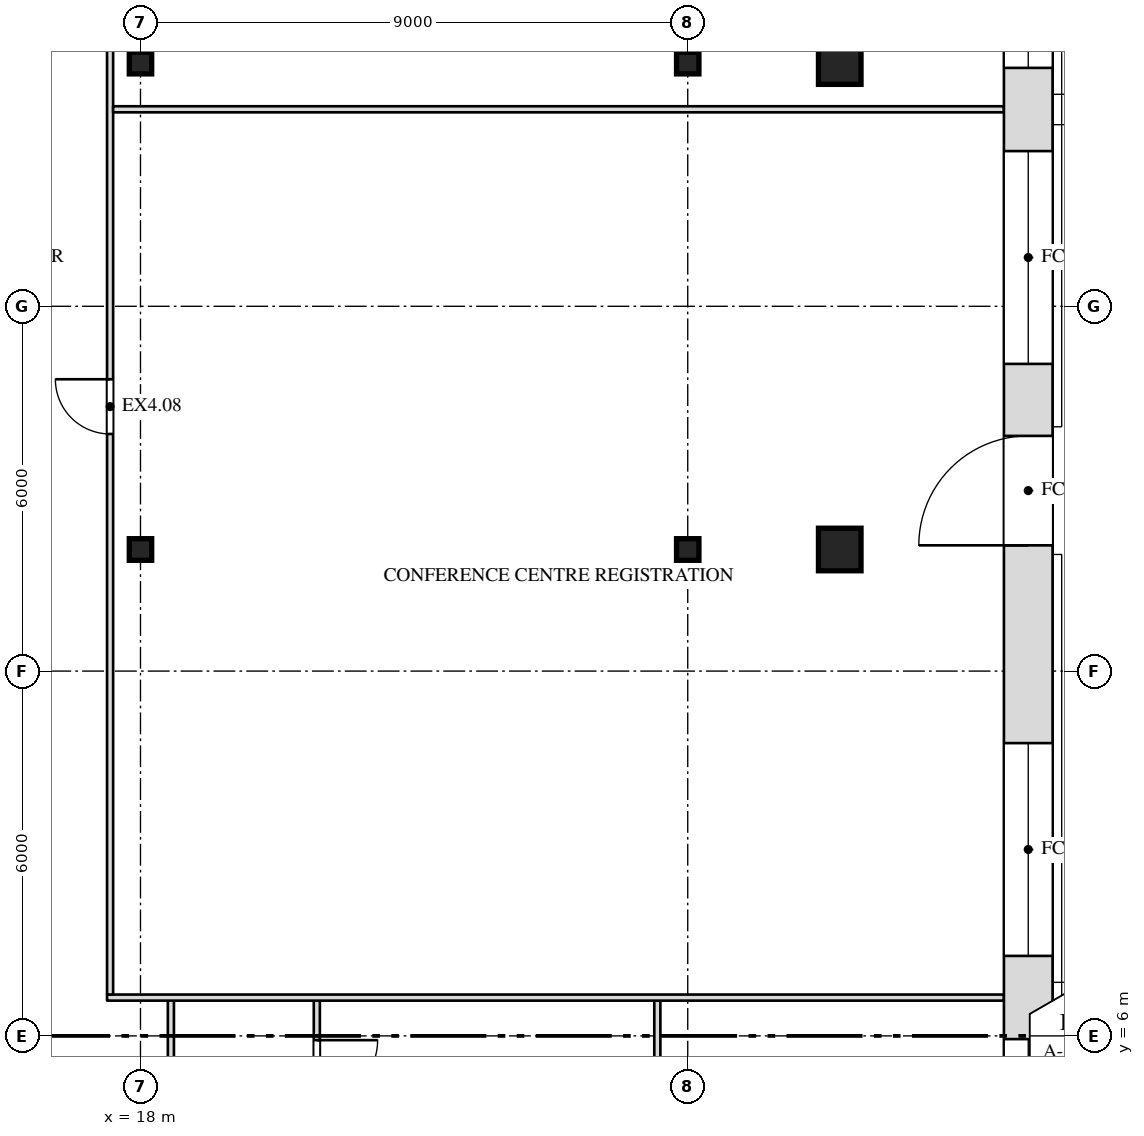
"""IFC4 building model, lengths in metres.
Left out: names, types, materials, properties, quantities, classifications, styles, units other than length and angle.
Written with IfcOpenShell. Run it as: python <this file> out.ifc"""

import sys

from ifc_helpers import new_model, si_unit, direction, frame, frame_2d, origin, origin_2d, place, context, subcontext, project, spatial, rectangle, i_section, extrude, element, fill, save


model = new_model("IFC4")
c1 = context("Model", 3, precision=1e-05, world=origin(), true_north=direction((0.0, 1.0)))
c2 = subcontext(c1, "Body", "Model", "MODEL_VIEW")
j1 = project(units=[si_unit("LENGTHUNIT", "METRE"), si_unit("PLANEANGLEUNIT", "RADIAN")], contexts=[c1])
p1 = place(None, origin())
s1 = spatial("IfcSite", under=j1, at=p1, CompositionType="ELEMENT")
p2 = place(p1, origin())
s2 = spatial("IfcBuilding", under=s1, at=p2, CompositionType="ELEMENT")
p3 = place(p2, frame((0.0, 0.0, 284.5)))
s3 = spatial("IfcBuildingStorey", under=s2, at=p3, CompositionType="ELEMENT", Elevation=284.5)
for number, where, z_axis, x_axis in (
    (1, (18.0, 14.0, 0.0), (0.0, 0.0, 1.0), (1.0, 0.0, 0.0)),
    (2, (27.0, 14.0, 0.0), (0.0, 0.0, 1.0), (1.0, 0.0, 0.0)),
):
    element("IfcColumn", number, at=place(p3, frame(where, z_axis=z_axis, x_axis=x_axis)), inside=s3, PredefinedType="COLUMN", context=c2, shape_type="SweptSolid", body=[
        extrude(i_section(OverallWidth=0.368, OverallDepth=0.356, WebThickness=0.011, FlangeThickness=0.018, at=origin_2d()), origin(), (0.0, 0.0, 1.0), 4.0),
    ])
p4 = place(p3, frame((29.5, 14.0, 0.0), z_axis=(0.0, 0.0, 1.0), x_axis=(1.0, 0.0, 0.0)))
e3 = element("IfcColumn", 3, at=p4, inside=s3, PredefinedType="COLUMN", context=c2, shape_type="SweptSolid", body=[
    extrude(rectangle(XDim=0.7, YDim=0.7, at=origin_2d()), origin(), (0.0, 0.0, 1.0), 4.0),
])
for number, where, z_axis, x_axis in (
    (4, (18.0, 22.0, 0.0), (0.0, 0.0, 1.0), (1.0, 0.0, 0.0)),
    (5, (27.0, 22.0, 0.0), (0.0, 0.0, 1.0), (1.0, 0.0, 0.0)),
):
    element("IfcColumn", number, at=place(p3, frame(where, z_axis=z_axis, x_axis=x_axis)), inside=s3, PredefinedType="COLUMN", context=c2, shape_type="SweptSolid", body=[
        extrude(i_section(OverallWidth=0.368, OverallDepth=0.356, WebThickness=0.011, FlangeThickness=0.018, at=origin_2d()), origin(), (0.0, 0.0, 1.0), 4.0),
    ])
p5 = place(p3, frame((29.5, 22.0, 0.0), z_axis=(0.0, 0.0, 1.0), x_axis=(1.0, 0.0, 0.0)))
e6 = element("IfcColumn", 6, at=p5, inside=s3, PredefinedType="COLUMN", context=c2, shape_type="SweptSolid", body=[
    extrude(rectangle(XDim=0.7, YDim=0.7, at=origin_2d()), origin(), (0.0, 0.0, 1.0), 4.0),
])
p6 = place(p3, frame((18.5, -2.0, 0.0), z_axis=(0.0, 0.0, 1.0), x_axis=(0.0, 1.0, 0.0)))
e7 = element("IfcWall", 7, at=p6, inside=s3, PredefinedType="PARTITIONING", context=c2, shape_type="SweptSolid", body=[
    extrude(rectangle(XDim=8.58, YDim=0.1, at=frame_2d((4.29, 0.0))), origin(), (0.0, 0.0, 1.0), 3.78),
])
p7 = place(p6, frame((3.8, 0.0, 0.0)))
e8 = element("IfcOpeningElement", 8, at=p7, cuts=e7, PredefinedType="OPENING", context=c2, shape_type="SweptSolid", body=[
    extrude(rectangle(XDim=1.0, YDim=2.1, at=frame_2d((0.5, 1.05))), frame((0.0, 0.062, 0.0), z_axis=(0.0, -1.0, 0.0), x_axis=(1.0, 0.0, 0.0)), (0.0, 0.0, 1.0), 0.124),
])
p8 = place(p3, frame((20.9, -2.0, 0.0), z_axis=(0.0, 0.0, 1.0), x_axis=(0.0, 1.0, 0.0)))
e9 = element("IfcWall", 9, at=p8, inside=s3, PredefinedType="PARTITIONING", context=c2, shape_type="SweptSolid", body=[
    extrude(rectangle(XDim=8.58, YDim=0.1, at=frame_2d((4.29, 0.0))), origin(), (0.0, 0.0, 1.0), 3.78),
])
p9 = place(p8, frame((1.05, 0.0, 0.0)))
e10 = element("IfcOpeningElement", 10, at=p9, cuts=e9, PredefinedType="OPENING", context=c2, shape_type="SweptSolid", body=[
    extrude(rectangle(XDim=1.0, YDim=2.1, at=frame_2d((0.5, 1.05))), frame((0.0, 0.062, 0.0), z_axis=(0.0, -1.0, 0.0), x_axis=(1.0, 0.0, 0.0)), (0.0, 0.0, 1.0), 0.124),
])
p10 = place(p8, frame((4.165, 0.0, 0.0)))
e11 = element("IfcOpeningElement", 11, at=p10, cuts=e9, PredefinedType="OPENING", context=c2, shape_type="SweptSolid", body=[
    extrude(rectangle(XDim=1.0, YDim=2.1, at=frame_2d((0.5, 1.05))), frame((0.0, 0.062, 0.0), z_axis=(0.0, -1.0, 0.0), x_axis=(1.0, 0.0, 0.0)), (0.0, 0.0, 1.0), 0.124),
])
p11 = place(p8, frame((6.93, 0.0, 0.0)))
e12 = element("IfcOpeningElement", 12, at=p11, cuts=e9, PredefinedType="OPENING", context=c2, shape_type="SweptSolid", body=[
    extrude(rectangle(XDim=1.0, YDim=2.1, at=frame_2d((0.5, 1.05))), frame((0.0, 0.062, 0.0), z_axis=(0.0, -1.0, 0.0), x_axis=(1.0, 0.0, 0.0)), (0.0, 0.0, 1.0), 0.124),
])
p12 = place(p3, frame((26.5, -2.0, 0.0), z_axis=(0.0, 0.0, 1.0), x_axis=(0.0, 1.0, 0.0)))
e13 = element("IfcWall", 13, at=p12, inside=s3, PredefinedType="PARTITIONING", context=c2, shape_type="SweptSolid", body=[
    extrude(rectangle(XDim=8.58, YDim=0.1, at=frame_2d((4.29, 0.0))), origin(), (0.0, 0.0, 1.0), 3.78),
])
p13 = place(p3, frame((17.45, 6.63, 0.0), z_axis=(0.0, 0.0, 1.0), x_axis=(1.0, 0.0, 0.0)))
e14 = element("IfcWall", 14, at=p13, inside=s3, PredefinedType="PARTITIONING", context=c2, shape_type="SweptSolid", body=[
    extrude(rectangle(XDim=14.75, YDim=0.1, at=frame_2d((7.375, 0.0))), origin(), (0.0, 0.0, 1.0), 3.78),
])
p14 = place(p3, frame((17.5, 6.68, 0.0), z_axis=(0.0, 0.0, 1.0), x_axis=(0.0, 1.0, 0.0)))
e15 = element("IfcWall", 15, at=p14, inside=s3, PredefinedType="PARTITIONING", context=c2, shape_type="SweptSolid", body=[
    extrude(rectangle(XDim=29.52, YDim=0.1, at=frame_2d((14.76, 0.0))), origin(), (0.0, 0.0, 1.0), 3.78),
])
p15 = place(p14, frame((9.22, 0.0, 0.0)))
e16 = element("IfcOpeningElement", 16, at=p15, cuts=e15, PredefinedType="OPENING", context=c2, shape_type="SweptSolid", body=[
    extrude(rectangle(XDim=0.9, YDim=2.1, at=frame_2d((0.45, 1.05))), frame((0.0, 0.062, 0.0), z_axis=(0.0, -1.0, 0.0), x_axis=(1.0, 0.0, 0.0)), (0.0, 0.0, 1.0), 0.124),
])
p16 = place(p14, frame((16.56, 0.0, 0.0)))
e17 = element("IfcOpeningElement", 17, at=p16, cuts=e15, PredefinedType="OPENING", context=c2, shape_type="SweptSolid", body=[
    extrude(rectangle(XDim=0.9, YDim=2.1, at=frame_2d((0.45, 1.05))), frame((0.0, 0.062, 0.0), z_axis=(0.0, -1.0, 0.0), x_axis=(1.0, 0.0, 0.0)), (0.0, 0.0, 1.0), 0.124),
])
p17 = place(p3, frame((17.55, 21.24, 0.0), z_axis=(0.0, 0.0, 1.0), x_axis=(1.0, 0.0, 0.0)))
e18 = element("IfcWall", 18, at=p17, inside=s3, PredefinedType="PARTITIONING", context=c2, shape_type="SweptSolid", body=[
    extrude(rectangle(XDim=14.65, YDim=0.1, at=frame_2d((7.325, 0.0))), origin(), (0.0, 0.0, 1.0), 3.78),
])
p18 = place(p3, frame((32.6, -7.948, 0.0), z_axis=(0.0, 0.0, 1.0), x_axis=(0.0, 1.0, 0.0)))
e19 = element("IfcWall", 19, at=p18, inside=s3, PredefinedType="SOLIDWALL", context=c2, shape_type="SweptSolid", body=[
    extrude(rectangle(XDim=38.895, YDim=0.8, at=frame_2d((19.448, 0.0))), origin(), (0.0, 0.0, 1.0), 3.78),
])
p19 = place(p18, frame((5.526, 0.0, 1.0)))
e20 = element("IfcOpeningElement", 20, at=p19, cuts=e19, PredefinedType="OPENING", context=c2, shape_type="SweptSolid", body=[
    extrude(rectangle(XDim=3.5, YDim=2.5, at=frame_2d((1.75, 1.25))), frame((0.0, 0.412, 0.0), z_axis=(0.0, -1.0, 0.0), x_axis=(1.0, 0.0, 0.0)), (0.0, 0.0, 1.0), 0.824),
])
p20 = place(p18, frame((10.395, 0.0, 1.0)))
e21 = element("IfcOpeningElement", 21, at=p20, cuts=e19, PredefinedType="OPENING", context=c2, shape_type="SweptSolid", body=[
    extrude(rectangle(XDim=3.5, YDim=2.5, at=frame_2d((1.75, 1.25))), frame((0.0, 0.412, 0.0), z_axis=(0.0, -1.0, 0.0), x_axis=(1.0, 0.0, 0.0)), (0.0, 0.0, 1.0), 0.824),
])
p21 = place(p18, frame((15.263, 0.0, 1.0)))
e22 = element("IfcOpeningElement", 22, at=p21, cuts=e19, PredefinedType="OPENING", context=c2, shape_type="SweptSolid", body=[
    extrude(rectangle(XDim=3.5, YDim=2.5, at=frame_2d((1.75, 1.25))), frame((0.0, 0.412, 0.0), z_axis=(0.0, -1.0, 0.0), x_axis=(1.0, 0.0, 0.0)), (0.0, 0.0, 1.0), 0.824),
])
p22 = place(p18, frame((25.0, 0.0, 1.0)))
e23 = element("IfcOpeningElement", 23, at=p22, cuts=e19, PredefinedType="OPENING", context=c2, shape_type="SweptSolid", body=[
    extrude(rectangle(XDim=3.5, YDim=2.5, at=frame_2d((1.75, 1.25))), frame((0.0, 0.412, 0.0), z_axis=(0.0, -1.0, 0.0), x_axis=(1.0, 0.0, 0.0)), (0.0, 0.0, 1.0), 0.824),
])
p23 = place(p18, frame((29.869, 0.0, 1.0)))
e24 = element("IfcOpeningElement", 24, at=p23, cuts=e19, PredefinedType="OPENING", context=c2, shape_type="SweptSolid", body=[
    extrude(rectangle(XDim=3.5, YDim=2.5, at=frame_2d((1.75, 1.25))), frame((0.0, 0.412, 0.0), z_axis=(0.0, -1.0, 0.0), x_axis=(1.0, 0.0, 0.0)), (0.0, 0.0, 1.0), 0.824),
])
p24 = place(p18, frame((22.016, 0.0, 0.0)))
e25 = element("IfcOpeningElement", 25, at=p24, cuts=e19, PredefinedType="OPENING", context=c2, shape_type="SweptSolid", body=[
    extrude(rectangle(XDim=1.8, YDim=2.4, at=frame_2d((0.9, 1.2))), frame((0.0, 0.412, 0.0), z_axis=(0.0, -1.0, 0.0), x_axis=(1.0, 0.0, 0.0)), (0.0, 0.0, 1.0), 0.824),
])
p25 = place(p11, origin())
e26 = element("IfcDoor", 26, at=p25, inside=s3, OperationType="SINGLE_SWING_LEFT", PredefinedType="DOOR", context=c2, shape_type="SweptSolid", body=[
    extrude(rectangle(XDim=1.0, YDim=2.1, at=frame_2d((0.5, 1.05))), frame((0.0, 0.025, 0.0), z_axis=(0.0, -1.0, 0.0), x_axis=(1.0, 0.0, 0.0)), (0.0, 0.0, 1.0), 0.05),
])
fill(e12, e26)
p26 = place(p15, origin())
e27 = element("IfcDoor", 27, at=p26, inside=s3, OperationType="SINGLE_SWING_RIGHT", PredefinedType="DOOR", context=c2, shape_type="SweptSolid", body=[
    extrude(rectangle(XDim=0.9, YDim=2.1, at=frame_2d((0.45, 1.05))), frame((0.0, 0.025, 0.0), z_axis=(0.0, -1.0, 0.0), x_axis=(1.0, 0.0, 0.0)), (0.0, 0.0, 1.0), 0.05),
])
fill(e16, e27)
p27 = place(p20, origin())
e28 = element("IfcWindow", 28, at=p27, inside=s3, PartitioningType="SINGLE_PANEL", PredefinedType="WINDOW", context=c2, shape_type="SweptSolid", body=[
    extrude(rectangle(XDim=3.5, YDim=2.5, at=frame_2d((1.75, 1.25))), frame((0.0, 0.03, 0.0), z_axis=(0.0, -1.0, 0.0), x_axis=(1.0, 0.0, 0.0)), (0.0, 0.0, 1.0), 0.06),
])
fill(e21, e28)
p28 = place(p21, origin())
e29 = element("IfcWindow", 29, at=p28, inside=s3, PartitioningType="SINGLE_PANEL", PredefinedType="WINDOW", context=c2, shape_type="SweptSolid", body=[
    extrude(rectangle(XDim=3.5, YDim=2.5, at=frame_2d((1.75, 1.25))), frame((0.0, 0.03, 0.0), z_axis=(0.0, -1.0, 0.0), x_axis=(1.0, 0.0, 0.0)), (0.0, 0.0, 1.0), 0.06),
])
fill(e22, e29)
p29 = place(p22, origin())
e30 = element("IfcWindow", 30, at=p29, inside=s3, PartitioningType="SINGLE_PANEL", PredefinedType="WINDOW", context=c2, shape_type="SweptSolid", body=[
    extrude(rectangle(XDim=3.5, YDim=2.5, at=frame_2d((1.75, 1.25))), frame((0.0, 0.03, 0.0), z_axis=(0.0, -1.0, 0.0), x_axis=(1.0, 0.0, 0.0)), (0.0, 0.0, 1.0), 0.06),
])
fill(e23, e30)
p30 = place(p23, origin())
e31 = element("IfcWindow", 31, at=p30, inside=s3, PartitioningType="SINGLE_PANEL", PredefinedType="WINDOW", context=c2, shape_type="SweptSolid", body=[
    extrude(rectangle(XDim=3.5, YDim=2.5, at=frame_2d((1.75, 1.25))), frame((0.0, 0.03, 0.0), z_axis=(0.0, -1.0, 0.0), x_axis=(1.0, 0.0, 0.0)), (0.0, 0.0, 1.0), 0.06),
])
fill(e24, e31)
p31 = place(p24, origin())
e32 = element("IfcDoor", 32, at=p31, inside=s3, OperationType="DOUBLE_DOOR_SINGLE_SWING", PredefinedType="DOOR", context=c2, shape_type="SweptSolid", body=[
    extrude(rectangle(XDim=1.8, YDim=2.4, at=frame_2d((0.9, 1.2))), frame((0.0, 0.025, 0.0), z_axis=(0.0, -1.0, 0.0), x_axis=(1.0, 0.0, 0.0)), (0.0, 0.0, 1.0), 0.05),
])
fill(e25, e32)
save(model, sys.argv[1])
